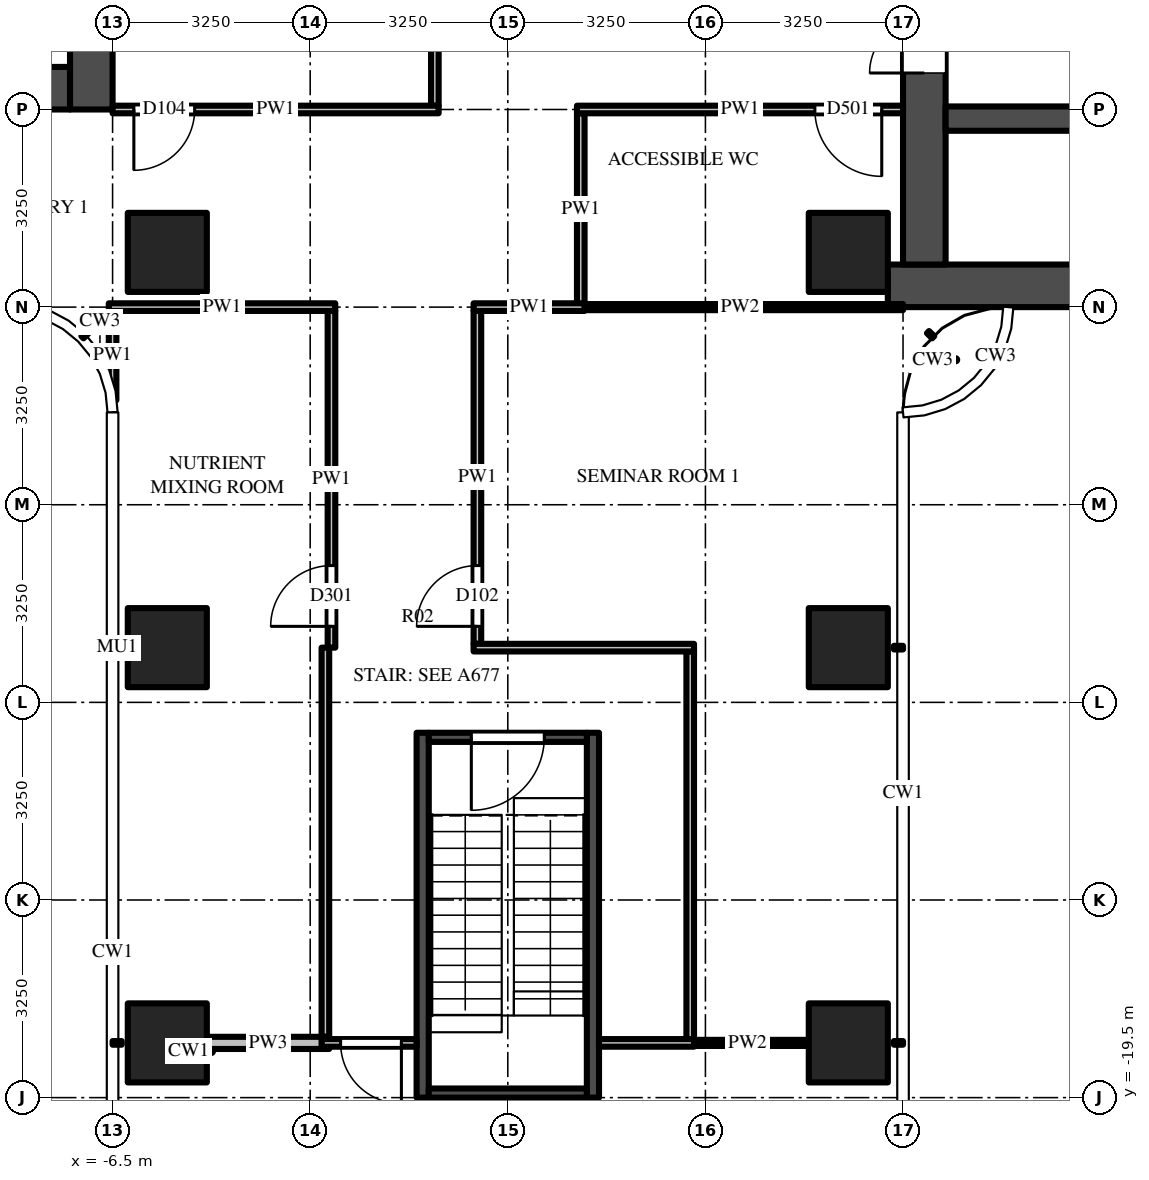
"""IFC4 building model, lengths in metres.
Left out: names, types, materials, properties, quantities, classifications, styles, units other than length and angle.
Written with IfcOpenShell. Run it as: python <this file> out.ifc"""

import sys

from ifc_helpers import new_model, si_unit, direction, frame, frame_2d, origin, origin_2d, place, context, subcontext, project, spatial, rectangle, extrude, source, transform, mapped, element, fill, save


model = new_model("IFC4")
c1 = context("Model", 3, precision=1e-05, world=origin(), true_north=direction((0.0, 1.0)))
c2 = subcontext(c1, "Body", "Model", "MODEL_VIEW")
j1 = project(units=[si_unit("LENGTHUNIT", "METRE"), si_unit("PLANEANGLEUNIT", "RADIAN")], contexts=[c1])
p1 = place(None, origin())
s1 = spatial("IfcSite", under=j1, at=p1, CompositionType="ELEMENT")
p2 = place(p1, origin())
s2 = spatial("IfcBuilding", under=s1, at=p2, CompositionType="ELEMENT")
p3 = place(p2, frame((0.0, 0.0, 106.5)))
s3 = spatial("IfcBuildingStorey", under=s2, at=p3, CompositionType="ELEMENT", Elevation=106.5)
m1 = source(origin(), c2, "Body", "SweptSolid", [
    extrude(rectangle(XDim=1.3, YDim=1.3, at=origin_2d()), origin(), (0.0, 0.0, 1.0), 4.5),
])
for number, where, z_axis, x_axis in (
    (1, (5.6, -5.6, 0.0), (0.0, 0.0, 1.0), (1.0, 0.0, 0.0)),
    (2, (-5.6, -5.6, 0.0), (0.0, 0.0, 1.0), (1.0, 0.0, 0.0)),
    (3, (5.6, -12.1, 0.0), (0.0, 0.0, 1.0), (1.0, 0.0, 0.0)),
    (4, (5.6, -18.6, 0.0), (0.0, 0.0, 1.0), (1.0, 0.0, 0.0)),
    (5, (-5.6, -12.1, 0.0), (0.0, 0.0, 1.0), (1.0, 0.0, 0.0)),
    (6, (-5.6, -18.6, 0.0), (0.0, 0.0, 1.0), (1.0, 0.0, 0.0)),
):
    element("IfcColumn", number, at=place(p3, frame(where, z_axis=z_axis, x_axis=x_axis)), inside=s3, PredefinedType="COLUMN", context=c2, shape_type="MappedRepresentation", body=[
        mapped(m1, transform((0.0, 0.0, 0.0))),
    ])
m2 = source(origin(), c2, "Body", "SweptSolid", [
    extrude(rectangle(XDim=16.5, YDim=0.7, at=frame_2d((8.25, 0.0))), origin(), (0.0, 0.0, 1.0), 4.25),
])
p4 = place(p3, frame((6.25, -6.15, 0.0), z_axis=(0.0, 0.0, 1.0), x_axis=(1.0, 0.0, 0.0)))
e7 = element("IfcWall", 7, at=p4, inside=s3, PredefinedType="SHEAR", context=c2, shape_type="MappedRepresentation", body=[
    mapped(m2, transform((0.0, 0.0, 0.0))),
])
m3 = source(origin(), c2, "Body", "SweptSolid", [
    extrude(rectangle(XDim=9.05, YDim=0.7, at=frame_2d((4.525, 0.0))), origin(), (0.0, 0.0, 1.0), 4.25),
])
p5 = place(p3, frame((6.85, -5.8, 0.0), z_axis=(0.0, 0.0, 1.0), x_axis=(0.0, 1.0, 0.0)))
e8 = element("IfcWall", 8, at=p5, inside=s3, PredefinedType="SHEAR", context=c2, shape_type="MappedRepresentation", body=[
    mapped(m3, transform((0.0, 0.0, 0.0))),
])
m4 = source(origin(), c2, "Body", "SweptSolid", [
    extrude(rectangle(XDim=1.8, YDim=2.1, at=frame_2d((0.9, 1.05))), frame((0.0, 0.36, 0.0), z_axis=(0.0, -1.0, 0.0), x_axis=(1.0, 0.0, 0.0)), (0.0, 0.0, 1.0), 0.72),
])
p6 = place(p5, frame((3.15, 0.0, 0.0)))
e9 = element("IfcOpeningElement", 9, at=p6, cuts=e8, PredefinedType="OPENING", context=c2, shape_type="MappedRepresentation", body=[
    mapped(m4, transform((0.0, 0.0, 0.0))),
])
m5 = source(origin(), c2, "Body", "SweptSolid", [
    extrude(rectangle(XDim=7.5, YDim=0.4, at=frame_2d((3.75, 0.0))), origin(), (0.0, 0.0, 1.0), 4.25),
])
p7 = place(p3, frame((7.2, -3.4, 0.0), z_axis=(0.0, 0.0, 1.0), x_axis=(1.0, 0.0, 0.0)))
e10 = element("IfcWall", 10, at=p7, inside=s3, PredefinedType="SHEAR", context=c2, shape_type="MappedRepresentation", body=[
    mapped(m5, transform((0.0, 0.0, 0.0))),
])
m6 = source(origin(), c2, "Body", "SweptSolid", [
    extrude(rectangle(XDim=1.1, YDim=2.1, at=frame_2d((0.55, 1.05))), frame((0.0, 0.21, 0.0), z_axis=(0.0, -1.0, 0.0), x_axis=(1.0, 0.0, 0.0)), (0.0, 0.0, 1.0), 0.42),
])
p8 = place(p7, frame((3.0, 0.0, 0.0)))
e11 = element("IfcOpeningElement", 11, at=p8, cuts=e10, PredefinedType="OPENING", context=c2, shape_type="MappedRepresentation", body=[
    mapped(m6, transform((0.0, 0.0, 0.0))),
])
p9 = place(p7, frame((5.5, 0.0, 0.0)))
e12 = element("IfcOpeningElement", 12, at=p9, cuts=e10, PredefinedType="OPENING", context=c2, shape_type="MappedRepresentation", body=[
    mapped(m6, transform((0.0, 0.0, 0.0))),
])
m7 = source(origin(), c2, "Body", "SweptSolid", [
    extrude(rectangle(XDim=14.85, YDim=0.7, at=frame_2d((7.425, 0.0))), origin(), (0.0, 0.0, 1.0), 4.25),
])
p10 = place(p3, frame((-7.2, -2.9, 0.0), z_axis=(0.0, 0.0, 1.0), x_axis=(-1.0, 0.0, 0.0)))
e13 = element("IfcWall", 13, at=p10, inside=s3, PredefinedType="SHEAR", context=c2, shape_type="MappedRepresentation", body=[
    mapped(m7, transform((0.0, 0.0, 0.0))),
])
m8 = source(origin(), c2, "Body", "SweptSolid", [
    extrude(rectangle(XDim=1.3, YDim=2.1, at=frame_2d((0.65, 1.05))), frame((0.0, 0.36, 0.0), z_axis=(0.0, -1.0, 0.0), x_axis=(1.0, 0.0, 0.0)), (0.0, 0.0, 1.0), 0.72),
])
p11 = place(p10, frame((12.2, 0.0, 0.0)))
e14 = element("IfcOpeningElement", 14, at=p11, cuts=e13, PredefinedType="OPENING", context=c2, shape_type="MappedRepresentation", body=[
    mapped(m8, transform((0.0, 0.0, 0.0))),
])
m9 = source(origin(), c2, "Body", "SweptSolid", [
    extrude(rectangle(XDim=1.2, YDim=2.1, at=frame_2d((0.6, 1.05))), frame((0.0, 0.36, 0.0), z_axis=(0.0, -1.0, 0.0), x_axis=(1.0, 0.0, 0.0)), (0.0, 0.0, 1.0), 0.72),
])
p12 = place(p10, frame((9.85, 0.0, 0.0)))
e15 = element("IfcOpeningElement", 15, at=p12, cuts=e13, PredefinedType="OPENING", context=c2, shape_type="MappedRepresentation", body=[
    mapped(m9, transform((0.0, 0.0, 0.0))),
])
m10 = source(origin(), c2, "Body", "SweptSolid", [
    extrude(rectangle(XDim=1.0, YDim=2.1, at=frame_2d((0.5, 1.05))), frame((0.0, 0.36, 0.0), z_axis=(0.0, -1.0, 0.0), x_axis=(1.0, 0.0, 0.0)), (0.0, 0.0, 1.0), 0.72),
])
p13 = place(p10, frame((7.9, 0.0, 0.0)))
e16 = element("IfcOpeningElement", 16, at=p13, cuts=e13, PredefinedType="OPENING", context=c2, shape_type="MappedRepresentation", body=[
    mapped(m10, transform((0.0, 0.0, 0.0))),
])
m11 = source(origin(), c2, "Body", "SweptSolid", [
    extrude(rectangle(XDim=0.9, YDim=2.1, at=frame_2d((0.45, 1.05))), frame((0.0, 0.36, 0.0), z_axis=(0.0, -1.0, 0.0), x_axis=(1.0, 0.0, 0.0)), (0.0, 0.0, 1.0), 0.72),
])
p14 = place(p10, frame((0.65, 0.0, 0.0)))
e17 = element("IfcOpeningElement", 17, at=p14, cuts=e13, PredefinedType="OPENING", context=c2, shape_type="MappedRepresentation", body=[
    mapped(m11, transform((0.0, 0.0, 0.0))),
])
p15 = place(p10, frame((3.25, 0.0, 0.0)))
e18 = element("IfcOpeningElement", 18, at=p15, cuts=e13, PredefinedType="OPENING", context=c2, shape_type="MappedRepresentation", body=[
    mapped(m11, transform((0.0, 0.0, 0.0))),
])
p16 = place(p10, frame((5.8, 0.0, 0.0)))
e19 = element("IfcOpeningElement", 19, at=p16, cuts=e13, PredefinedType="OPENING", context=c2, shape_type="MappedRepresentation", body=[
    mapped(m10, transform((0.0, 0.0, 0.0))),
])
p17 = place(p3, frame((-6.85, 5.8, 0.0), z_axis=(0.0, 0.0, 1.0), x_axis=(0.0, -1.0, 0.0)))
e20 = element("IfcWall", 20, at=p17, inside=s3, PredefinedType="SHEAR", context=c2, shape_type="MappedRepresentation", body=[
    mapped(m3, transform((0.0, 0.0, 0.0))),
])
p18 = place(p17, frame((3.15, 0.0, 0.0)))
e21 = element("IfcOpeningElement", 21, at=p18, cuts=e20, PredefinedType="OPENING", context=c2, shape_type="MappedRepresentation", body=[
    mapped(m4, transform((0.0, 0.0, 0.0))),
])
m12 = source(origin(), c2, "Body", "SweptSolid", [
    extrude(rectangle(XDim=6.0, YDim=0.2, at=frame_2d((3.0, 0.0))), origin(), (0.0, 0.0, 1.0), 4.25),
])
for number, where, z_axis, x_axis in (
    (22, (1.4, -13.5, 0.0), (0.0, 0.0, 1.0), (0.0, -1.0, 0.0)),
    (23, (-1.4, -13.5, 0.0), (0.0, 0.0, 1.0), (0.0, -1.0, 0.0)),
):
    element("IfcWall", number, at=place(p3, frame(where, z_axis=z_axis, x_axis=x_axis)), inside=s3, PredefinedType="SHEAR", context=c2, shape_type="MappedRepresentation", body=[
        mapped(m12, transform((0.0, 0.0, 0.0))),
    ])
m13 = source(origin(), c2, "Body", "SweptSolid", [
    extrude(rectangle(XDim=2.6, YDim=0.15, at=frame_2d((1.3, 0.0))), origin(), (0.0, 0.0, 1.0), 4.25),
])
p19 = place(p3, frame((1.3, -13.575, 0.0), z_axis=(0.0, 0.0, 1.0), x_axis=(-1.0, 0.0, 0.0)))
e24 = element("IfcWall", 24, at=p19, inside=s3, PredefinedType="SHEAR", context=c2, shape_type="MappedRepresentation", body=[
    mapped(m13, transform((0.0, 0.0, 0.0))),
])
m14 = source(origin(), c2, "Body", "SweptSolid", [
    extrude(rectangle(XDim=1.2, YDim=2.1, at=frame_2d((0.6, 1.05))), frame((0.0, 0.085, 0.0), z_axis=(0.0, -1.0, 0.0), x_axis=(1.0, 0.0, 0.0)), (0.0, 0.0, 1.0), 0.17),
])
p20 = place(p19, frame((0.7, 0.0, 0.0)))
e25 = element("IfcOpeningElement", 25, at=p20, cuts=e24, PredefinedType="OPENING", context=c2, shape_type="MappedRepresentation", body=[
    mapped(m14, transform((0.0, 0.0, 0.0))),
])
p21 = place(p3, frame((1.3, -19.425, 0.0), z_axis=(0.0, 0.0, 1.0), x_axis=(-1.0, 0.0, 0.0)))
e26 = element("IfcWall", 26, at=p21, inside=s3, PredefinedType="SHEAR", context=c2, shape_type="MappedRepresentation", body=[
    mapped(m13, transform((0.0, 0.0, 0.0))),
])
m15 = source(origin(), c2, "Body", "SweptSolid", [
    extrude(rectangle(XDim=1.469, YDim=0.125, at=frame_2d((0.734, 0.0))), origin(), (0.0, 0.0, 1.0), 4.25),
])
p22 = place(p3, frame((-6.5, -6.562, 0.0), z_axis=(0.0, 0.0, 1.0), x_axis=(0.0, -1.0, 0.0)))
e27 = element("IfcWall", 27, at=p22, inside=s3, PredefinedType="PARTITIONING", context=c2, shape_type="MappedRepresentation", body=[
    mapped(m15, transform((0.0, 0.0, 0.0))),
])
m16 = source(origin(), c2, "Body", "SweptSolid", [
    extrude(rectangle(XDim=6.4, YDim=0.125, at=frame_2d((3.2, 0.0))), origin(), (0.0, 0.0, 1.0), 3.468),
])
p23 = place(p3, frame((-3.0, -18.5, 0.0), z_axis=(0.0, 0.0, 1.0), x_axis=(0.0, 1.0, 0.0)))
e28 = element("IfcWall", 28, at=p23, inside=s3, PredefinedType="PARTITIONING", context=c2, shape_type="MappedRepresentation", body=[
    mapped(m16, transform((0.0, 0.0, 0.0))),
])
m17 = source(origin(), c2, "Body", "SweptSolid", [
    extrude(rectangle(XDim=5.538, YDim=0.125, at=frame_2d((2.769, 0.0))), origin(), (0.0, 0.0, 1.0), 3.468),
])
p24 = place(p3, frame((-2.9, -12.1, 0.0), z_axis=(0.0, 0.0, 1.0), x_axis=(0.0, 1.0, 0.0)))
e29 = element("IfcWall", 29, at=p24, inside=s3, PredefinedType="PARTITIONING", context=c2, shape_type="MappedRepresentation", body=[
    mapped(m17, transform((0.0, 0.0, 0.0))),
])
m18 = source(origin(), c2, "Body", "SweptSolid", [
    extrude(rectangle(XDim=1.0, YDim=2.1, at=frame_2d((0.5, 1.05))), frame((0.0, 0.073, 0.0), z_axis=(0.0, -1.0, 0.0), x_axis=(1.0, 0.0, 0.0)), (0.0, 0.0, 1.0), 0.145),
])
p25 = place(p24, frame((0.35, 0.0, 0.0)))
e30 = element("IfcOpeningElement", 30, at=p25, cuts=e29, PredefinedType="OPENING", context=c2, shape_type="MappedRepresentation", body=[
    mapped(m18, transform((0.0, 0.0, 0.0))),
])
m19 = source(origin(), c2, "Body", "SweptSolid", [
    extrude(rectangle(XDim=3.125, YDim=0.125, at=frame_2d((1.562, 0.0))), origin(), (0.0, 0.0, 1.0), 3.546),
])
p26 = place(p3, frame((-1.2, -0.062, 0.0), z_axis=(0.0, 0.0, 1.0), x_axis=(0.0, -1.0, 0.0)))
e31 = element("IfcWall", 31, at=p26, inside=s3, PredefinedType="PARTITIONING", context=c2, shape_type="MappedRepresentation", body=[
    mapped(m19, transform((0.0, 0.0, 0.0))),
])
m20 = source(origin(), c2, "Body", "SweptSolid", [
    extrude(rectangle(XDim=5.475, YDim=0.125, at=frame_2d((2.738, 0.0))), origin(), (0.0, 0.0, 1.0), 3.468),
])
p27 = place(p3, frame((-0.5, -12.038, 0.0), z_axis=(0.0, 0.0, 1.0), x_axis=(0.0, 1.0, 0.0)))
e32 = element("IfcWall", 32, at=p27, inside=s3, PredefinedType="PARTITIONING", context=c2, shape_type="MappedRepresentation", body=[
    mapped(m20, transform((0.0, 0.0, 0.0))),
])
p28 = place(p27, frame((0.288, 0.0, 0.0)))
e33 = element("IfcOpeningElement", 33, at=p28, cuts=e32, PredefinedType="OPENING", context=c2, shape_type="MappedRepresentation", body=[
    mapped(m18, transform((0.0, 0.0, 0.0))),
])
m21 = source(origin(), c2, "Body", "SweptSolid", [
    extrude(rectangle(XDim=3.137, YDim=0.125, at=frame_2d((1.569, 0.0))), origin(), (0.0, 0.0, 1.0), 3.468),
])
p29 = place(p3, frame((1.2, -3.312, 0.0), z_axis=(0.0, 0.0, 1.0), x_axis=(0.0, -1.0, 0.0)))
e34 = element("IfcWall", 34, at=p29, inside=s3, PredefinedType="PARTITIONING", context=c2, shape_type="MappedRepresentation", body=[
    mapped(m21, transform((0.0, 0.0, 0.0))),
])
m22 = source(origin(), c2, "Body", "SweptSolid", [
    extrude(rectangle(XDim=6.387, YDim=0.125, at=frame_2d((3.194, 0.0))), origin(), (0.0, 0.0, 1.0), 3.468),
])
p30 = place(p3, frame((3.0, -12.163, 0.0), z_axis=(0.0, 0.0, 1.0), x_axis=(0.0, -1.0, 0.0)))
e35 = element("IfcWall", 35, at=p30, inside=s3, PredefinedType="PARTITIONING", context=c2, shape_type="MappedRepresentation", body=[
    mapped(m22, transform((0.0, 0.0, 0.0))),
])
m23 = source(origin(), c2, "Body", "SweptSolid", [
    extrude(rectangle(XDim=2.012, YDim=0.2, at=frame_2d((1.006, 0.0))), origin(), (0.0, 0.0, 1.0), 3.697),
])
p31 = place(p3, frame((-4.95, -18.6, 0.0), z_axis=(0.0, 0.0, 1.0), x_axis=(1.0, 0.0, 0.0)))
e36 = element("IfcWall", 36, at=p31, inside=s3, PredefinedType="PARTITIONING", context=c2, shape_type="MappedRepresentation", body=[
    mapped(m23, transform((0.0, 0.0, 0.0))),
])
m24 = source(origin(), c2, "Body", "SweptSolid", [
    extrude(rectangle(XDim=2.012, YDim=0.1, at=frame_2d((1.006, 0.0))), origin(), (0.0, 0.0, 1.0), 3.697),
])
p32 = place(p3, frame((2.938, -18.6, 0.0), z_axis=(0.0, 0.0, 1.0), x_axis=(1.0, 0.0, 0.0)))
e37 = element("IfcWall", 37, at=p32, inside=s3, PredefinedType="PARTITIONING", context=c2, shape_type="MappedRepresentation", body=[
    mapped(m24, transform((0.0, 0.0, 0.0))),
])
m25 = source(origin(), c2, "Body", "SweptSolid", [
    extrude(rectangle(XDim=1.562, YDim=0.125, at=frame_2d((0.781, 0.0))), origin(), (0.0, 0.0, 1.0), 3.697),
])
p33 = place(p3, frame((-1.5, -18.6, 0.0), z_axis=(0.0, 0.0, 1.0), x_axis=(-1.0, 0.0, 0.0)))
e38 = element("IfcWall", 38, at=p33, inside=s3, PredefinedType="PARTITIONING", context=c2, shape_type="MappedRepresentation", body=[
    mapped(m25, transform((0.0, 0.0, 0.0))),
])
p34 = place(p33, frame((0.25, 0.0, 0.0)))
e39 = element("IfcOpeningElement", 39, at=p34, cuts=e38, PredefinedType="OPENING", context=c2, shape_type="MappedRepresentation", body=[
    mapped(m18, transform((0.0, 0.0, 0.0))),
])
p35 = place(p3, frame((3.062, -18.6, 0.0), z_axis=(0.0, 0.0, 1.0), x_axis=(-1.0, 0.0, 0.0)))
e40 = element("IfcWall", 40, at=p35, inside=s3, PredefinedType="PARTITIONING", context=c2, shape_type="MappedRepresentation", body=[
    mapped(m25, transform((0.0, 0.0, 0.0))),
])
m26 = source(origin(), c2, "Body", "SweptSolid", [
    extrude(rectangle(XDim=3.625, YDim=0.125, at=frame_2d((1.812, 0.0))), origin(), (0.0, 0.0, 1.0), 3.468),
])
p36 = place(p3, frame((-0.562, -12.1, 0.0), z_axis=(0.0, 0.0, 1.0), x_axis=(1.0, 0.0, 0.0)))
e41 = element("IfcWall", 41, at=p36, inside=s3, PredefinedType="PARTITIONING", context=c2, shape_type="MappedRepresentation", body=[
    mapped(m26, transform((0.0, 0.0, 0.0))),
])
m27 = source(origin(), c2, "Body", "SweptSolid", [
    extrude(rectangle(XDim=5.363, YDim=0.1, at=frame_2d((2.681, 0.0))), origin(), (0.0, 0.0, 1.0), 3.33),
])
p37 = place(p3, frame((1.137, -6.5, 0.0), z_axis=(0.0, 0.0, 1.0), x_axis=(1.0, 0.0, 0.0)))
e42 = element("IfcWall", 42, at=p37, inside=s3, PredefinedType="PARTITIONING", context=c2, shape_type="MappedRepresentation", body=[
    mapped(m27, transform((0.0, 0.0, 0.0))),
])
m28 = source(origin(), c2, "Body", "SweptSolid", [
    extrude(rectangle(XDim=3.725, YDim=0.125, at=frame_2d((1.863, 0.0))), origin(), (0.0, 0.0, 1.0), 3.33),
])
p38 = place(p3, frame((-2.837, -6.5, 0.0), z_axis=(0.0, 0.0, 1.0), x_axis=(-1.0, 0.0, 0.0)))
e43 = element("IfcWall", 43, at=p38, inside=s3, PredefinedType="PARTITIONING", context=c2, shape_type="MappedRepresentation", body=[
    mapped(m28, transform((0.0, 0.0, 0.0))),
])
m29 = source(origin(), c2, "Body", "SweptSolid", [
    extrude(rectangle(XDim=1.825, YDim=0.125, at=frame_2d((0.913, 0.0))), origin(), (0.0, 0.0, 1.0), 4.25),
])
p39 = place(p3, frame((1.262, -6.5, 0.0), z_axis=(0.0, 0.0, 1.0), x_axis=(-1.0, 0.0, 0.0)))
e44 = element("IfcWall", 44, at=p39, inside=s3, PredefinedType="PARTITIONING", context=c2, shape_type="MappedRepresentation", body=[
    mapped(m29, transform((0.0, 0.0, 0.0))),
])
m30 = source(origin(), c2, "Body", "SweptSolid", [
    extrude(rectangle(XDim=5.363, YDim=0.125, at=frame_2d((2.681, 0.0))), origin(), (0.0, 0.0, 1.0), 3.468),
])
p40 = place(p3, frame((-1.137, -3.25, 0.0), z_axis=(0.0, 0.0, 1.0), x_axis=(-1.0, 0.0, 0.0)))
e45 = element("IfcWall", 45, at=p40, inside=s3, PredefinedType="PARTITIONING", context=c2, shape_type="MappedRepresentation", body=[
    mapped(m30, transform((0.0, 0.0, 0.0))),
])
p41 = place(p40, frame((4.012, 0.0, 0.0)))
e46 = element("IfcOpeningElement", 46, at=p41, cuts=e45, PredefinedType="OPENING", context=c2, shape_type="MappedRepresentation", body=[
    mapped(m18, transform((0.0, 0.0, 0.0))),
])
p42 = place(p3, frame((6.5, -3.25, 0.0), z_axis=(0.0, 0.0, 1.0), x_axis=(-1.0, 0.0, 0.0)))
e47 = element("IfcWall", 47, at=p42, inside=s3, PredefinedType="PARTITIONING", context=c2, shape_type="MappedRepresentation", body=[
    mapped(m30, transform((0.0, 0.0, 0.0))),
])
m31 = source(origin(), c2, "Body", "SweptSolid", [
    extrude(rectangle(XDim=1.1, YDim=2.1, at=frame_2d((0.55, 1.05))), frame((0.0, 0.073, 0.0), z_axis=(0.0, -1.0, 0.0), x_axis=(1.0, 0.0, 0.0)), (0.0, 0.0, 1.0), 0.145),
])
p43 = place(p42, frame((0.35, 0.0, 0.0)))
e48 = element("IfcOpeningElement", 48, at=p43, cuts=e47, PredefinedType="OPENING", context=c2, shape_type="MappedRepresentation", body=[
    mapped(m31, transform((0.0, 0.0, 0.0))),
])
m32 = source(origin(), c2, "Body", "SweptSolid", [
    extrude(rectangle(XDim=1.8, YDim=2.1, at=frame_2d((0.9, 1.05))), frame((0.0, -0.275, 0.0), z_axis=(0.0, -1.0, 0.0), x_axis=(1.0, 0.0, 0.0)), (0.0, 0.0, 1.0), 0.05),
])
p44 = place(p6, origin())
e49 = element("IfcDoor", 49, at=p44, inside=s3, OperationType="DOUBLE_DOOR_SINGLE_SWING", PredefinedType="DOOR", context=c2, shape_type="MappedRepresentation", body=[
    mapped(m32, transform((0.0, 0.0, 0.0))),
])
fill(e9, e49)
m33 = source(origin(), c2, "Body", "SweptSolid", [
    extrude(rectangle(XDim=1.2, YDim=2.1, at=frame_2d((0.6, 1.05))), frame((0.0, 0.025, 0.0), z_axis=(0.0, -1.0, 0.0), x_axis=(1.0, 0.0, 0.0)), (0.0, 0.0, 1.0), 0.05),
])
p45 = place(p20, origin())
e50 = element("IfcDoor", 50, at=p45, inside=s3, OperationType="SINGLE_SWING_RIGHT", PredefinedType="DOOR", context=c2, shape_type="MappedRepresentation", body=[
    mapped(m33, transform((0.0, 0.0, 0.0))),
])
fill(e25, e50)
m34 = source(origin(), c2, "Body", "SweptSolid", [
    extrude(rectangle(XDim=1.0, YDim=2.1, at=frame_2d((0.5, 1.05))), frame((0.0, 0.025, 0.0), z_axis=(0.0, -1.0, 0.0), x_axis=(1.0, 0.0, 0.0)), (0.0, 0.0, 1.0), 0.05),
])
p46 = place(p34, origin())
e51 = element("IfcDoor", 51, at=p46, inside=s3, OperationType="SINGLE_SWING_LEFT", PredefinedType="DOOR", context=c2, shape_type="MappedRepresentation", body=[
    mapped(m34, transform((0.0, 0.0, 0.0))),
])
fill(e39, e51)
p47 = place(p25, origin())
e52 = element("IfcDoor", 52, at=p47, inside=s3, OperationType="SINGLE_SWING_LEFT", PredefinedType="DOOR", context=c2, shape_type="MappedRepresentation", body=[
    mapped(m34, transform((0.0, 0.0, 0.0))),
])
fill(e30, e52)
p48 = place(p28, origin())
e53 = element("IfcDoor", 53, at=p48, inside=s3, OperationType="SINGLE_SWING_LEFT", PredefinedType="DOOR", context=c2, shape_type="MappedRepresentation", body=[
    mapped(m34, transform((0.0, 0.0, 0.0))),
])
fill(e33, e53)
p49 = place(p41, origin())
e54 = element("IfcDoor", 54, at=p49, inside=s3, OperationType="SINGLE_SWING_RIGHT", PredefinedType="DOOR", context=c2, shape_type="MappedRepresentation", body=[
    mapped(m34, transform((0.0, 0.0, 0.0))),
])
fill(e46, e54)
m35 = source(origin(), c2, "Body", "SweptSolid", [
    extrude(rectangle(XDim=1.1, YDim=2.1, at=frame_2d((0.55, 1.05))), frame((0.0, 0.025, 0.0), z_axis=(0.0, -1.0, 0.0), x_axis=(1.0, 0.0, 0.0)), (0.0, 0.0, 1.0), 0.05),
])
p50 = place(p43, origin())
e55 = element("IfcDoor", 55, at=p50, inside=s3, OperationType="SINGLE_SWING_LEFT", PredefinedType="DOOR", context=c2, shape_type="MappedRepresentation", body=[
    mapped(m35, transform((0.0, 0.0, 0.0))),
])
fill(e48, e55)
save(model, sys.argv[1])
